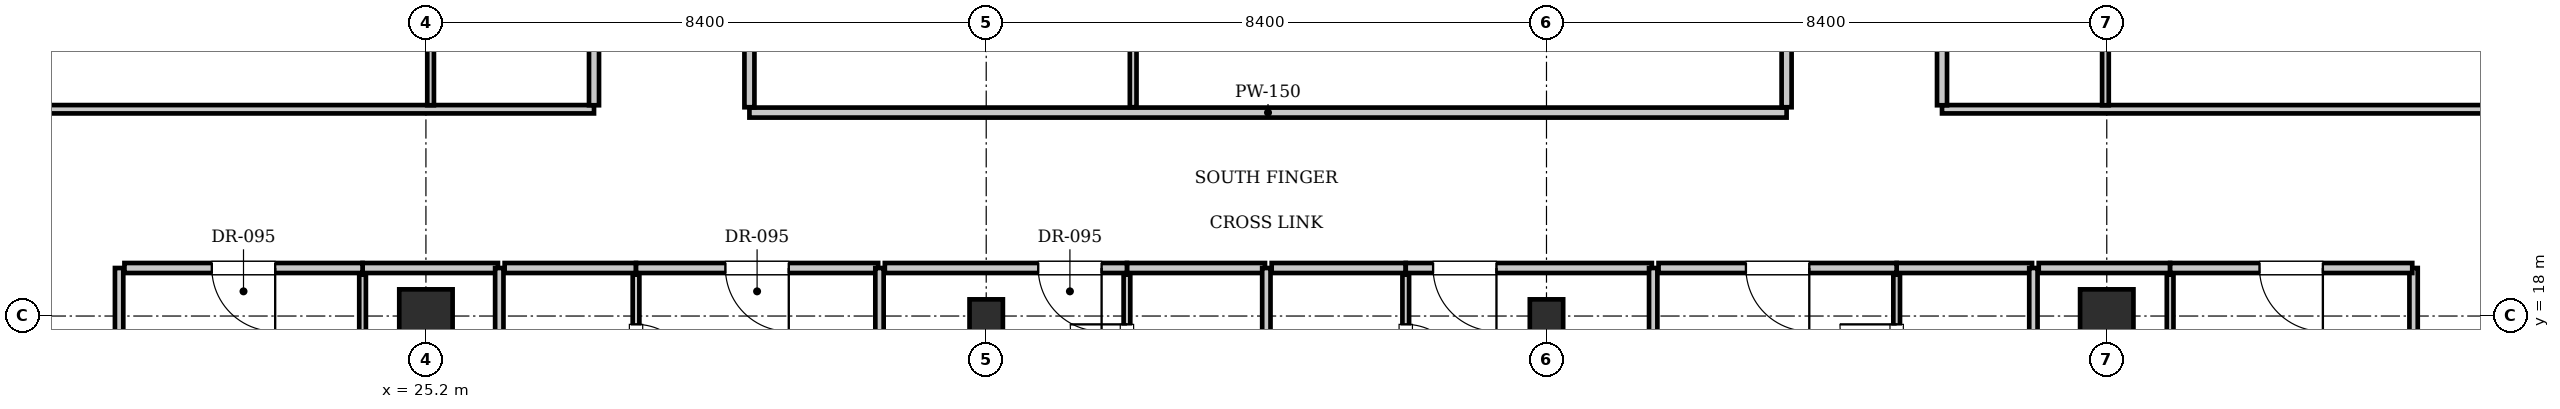
"""IFC4 building model, lengths in metres.
Left out: names, types, materials, properties, quantities, classifications, styles, units other than length and angle.
Written with IfcOpenShell. Run it as: python <this file> out.ifc"""

import sys

from ifc_helpers import new_model, si_unit, direction, frame, frame_2d, origin, origin_2d, place, context, subcontext, project, spatial, rectangle, i_section, extrude, element, fill, save


model = new_model("IFC4")
c1 = context("Model", 3, precision=1e-05, world=origin(), true_north=direction((0.0, 1.0)))
c2 = subcontext(c1, "Body", "Model", "MODEL_VIEW")
j1 = project(units=[si_unit("LENGTHUNIT", "METRE"), si_unit("PLANEANGLEUNIT", "RADIAN")], contexts=[c1])
p1 = place(None, origin())
s1 = spatial("IfcSite", under=j1, at=p1, CompositionType="ELEMENT")
p2 = place(p1, origin())
s2 = spatial("IfcBuilding", under=s1, at=p2, CompositionType="ELEMENT")
p3 = place(p2, frame((0.0, 0.0, 239.4)))
s3 = spatial("IfcBuildingStorey", under=s2, at=p3, CompositionType="ELEMENT", Elevation=239.4)
for number, where, z_axis, x_axis in (
    (1, (25.2, 18.0, 0.0), (0.0, 0.0, 1.0), (1.0, 0.0, 0.0)),
    (2, (50.4, 18.0, 0.0), (0.0, 0.0, 1.0), (1.0, 0.0, 0.0)),
):
    element("IfcColumn", number, at=place(p3, frame(where, z_axis=z_axis, x_axis=x_axis)), inside=s3, PredefinedType="COLUMN", context=c2, shape_type="SweptSolid", body=[
        extrude(rectangle(XDim=0.8, YDim=0.8, at=origin_2d()), origin(), (0.0, 0.0, 1.0), 3.85),
    ])
for number, where, z_axis, x_axis in (
    (3, (33.6, 18.0, 0.0), (0.0, 0.0, 1.0), (1.0, 0.0, 0.0)),
    (4, (42.0, 18.0, 0.0), (0.0, 0.0, 1.0), (1.0, 0.0, 0.0)),
):
    element("IfcColumn", number, at=place(p3, frame(where, z_axis=z_axis, x_axis=x_axis)), inside=s3, PredefinedType="COLUMN", context=c2, shape_type="SweptSolid", body=[
        extrude(i_section(OverallWidth=0.5, OverallDepth=0.5, WebThickness=0.022, FlangeThickness=0.032, at=origin_2d()), origin(), (0.0, 0.0, 1.0), 3.85),
    ])
p4 = place(p3, frame((30.05, 21.05, 0.0), z_axis=(0.0, 0.0, 1.0), x_axis=(1.0, 0.0, 0.0)))
e5 = element("IfcWall", 5, at=p4, inside=s3, PredefinedType="PARTITIONING", context=c2, shape_type="SweptSolid", body=[
    extrude(rectangle(XDim=15.55, YDim=0.15, at=frame_2d((7.775, 0.0))), origin(), (0.0, 0.0, 1.0), 3.61),
])
for number, where, z_axis, x_axis in (
    (6, (30.05, 21.13, 0.0), (0.0, 0.0, 1.0), (0.0, 1.0, 0.0)),
    (7, (45.6, 21.13, 0.0), (0.0, 0.0, 1.0), (0.0, 1.0, 0.0)),
):
    element("IfcWall", number, at=place(p3, frame(where, z_axis=z_axis, x_axis=x_axis)), inside=s3, PredefinedType="PARTITIONING", context=c2, shape_type="SweptSolid", body=[
        extrude(rectangle(XDim=9.49, YDim=0.15, at=frame_2d((4.745, 0.0))), origin(), (0.0, 0.0, 1.0), 3.61),
    ])
p5 = place(p3, frame((35.803, 21.13, 0.0), z_axis=(0.0, 0.0, 1.0), x_axis=(0.0, 1.0, 0.0)))
e8 = element("IfcWall", 8, at=p5, inside=s3, PredefinedType="PARTITIONING", context=c2, shape_type="SweptSolid", body=[
    extrude(rectangle(XDim=9.49, YDim=0.1, at=frame_2d((4.745, 0.0))), origin(), (0.0, 0.0, 1.0), 3.61),
])
for number, where, z_axis, x_axis in (
    (9, (20.6, 14.4, 0.0), (0.0, 0.0, 1.0), (0.0, 1.0, 0.0)),
    (10, (55.0, 14.4, 0.0), (0.0, 0.0, 1.0), (0.0, 1.0, 0.0)),
):
    element("IfcWall", number, at=place(p3, frame(where, z_axis=z_axis, x_axis=x_axis)), inside=s3, PredefinedType="PARTITIONING", context=c2, shape_type="SweptSolid", body=[
        extrude(rectangle(XDim=4.32, YDim=0.125, at=frame_2d((2.16, 0.0))), origin(), (0.0, 0.0, 1.0), 3.61),
    ])
p6 = place(p3, frame((24.25, 18.72, 0.0), z_axis=(0.0, 0.0, 1.0), x_axis=(1.0, 0.0, 0.0)))
e11 = element("IfcWall", 11, at=p6, inside=s3, PredefinedType="PARTITIONING", context=c2, shape_type="SweptSolid", body=[
    extrude(rectangle(XDim=2.03, YDim=0.15, at=frame_2d((1.015, 0.0))), origin(), (0.0, 0.0, 1.0), 3.61),
])
p7 = place(p3, frame((24.25, 16.28, 0.0), z_axis=(0.0, 0.0, 1.0), x_axis=(0.0, 1.0, 0.0)))
e12 = element("IfcWall", 12, at=p7, inside=s3, PredefinedType="PARTITIONING", context=c2, shape_type="SweptSolid", body=[
    extrude(rectangle(XDim=2.34, YDim=0.1, at=frame_2d((1.17, 0.0))), origin(), (0.0, 0.0, 1.0), 3.61),
])
p8 = place(p7, frame((0.265, 0.0, 0.0)))
e13 = element("IfcOpeningElement", 13, at=p8, cuts=e12, PredefinedType="OPENING", context=c2, shape_type="SweptSolid", body=[
    extrude(rectangle(XDim=0.85, YDim=2.1, at=frame_2d((0.425, 1.05))), frame((0.0, 0.06, 0.0), z_axis=(0.0, -1.0, 0.0), x_axis=(1.0, 0.0, 0.0)), (0.0, 0.0, 1.0), 0.12),
])
p9 = place(p3, frame((20.68, 18.72, 0.0), z_axis=(0.0, 0.0, 1.0), x_axis=(1.0, 0.0, 0.0)))
e14 = element("IfcWall", 14, at=p9, inside=s3, PredefinedType="PARTITIONING", context=c2, shape_type="SweptSolid", body=[
    extrude(rectangle(XDim=3.57, YDim=0.15, at=frame_2d((1.785, 0.0))), origin(), (0.0, 0.0, 1.0), 3.61),
])
p10 = place(p9, frame((1.31, 0.0, 0.0)))
e15 = element("IfcOpeningElement", 15, at=p10, cuts=e14, PredefinedType="OPENING", context=c2, shape_type="SweptSolid", body=[
    extrude(rectangle(XDim=0.95, YDim=2.15, at=frame_2d((0.475, 1.075))), frame((0.0, 0.085, 0.0), z_axis=(0.0, -1.0, 0.0), x_axis=(1.0, 0.0, 0.0)), (0.0, 0.0, 1.0), 0.17),
])
p11 = place(p3, frame((26.3, 9.3, 0.0), z_axis=(0.0, 0.0, 1.0), x_axis=(0.0, 1.0, 0.0)))
e16 = element("IfcWall", 16, at=p11, inside=s3, PredefinedType="PARTITIONING", context=c2, shape_type="SweptSolid", body=[
    extrude(rectangle(XDim=9.42, YDim=0.125, at=frame_2d((4.71, 0.0))), origin(), (0.0, 0.0, 1.0), 3.61),
])
p12 = place(p3, frame((26.38, 18.72, 0.0), z_axis=(0.0, 0.0, 1.0), x_axis=(1.0, 0.0, 0.0)))
e17 = element("IfcWall", 17, at=p12, inside=s3, PredefinedType="PARTITIONING", context=c2, shape_type="SweptSolid", body=[
    extrude(rectangle(XDim=1.97, YDim=0.15, at=frame_2d((0.985, 0.0))), origin(), (0.0, 0.0, 1.0), 3.61),
])
p13 = place(p3, frame((28.35, 16.28, 0.0), z_axis=(0.0, 0.0, 1.0), x_axis=(0.0, 1.0, 0.0)))
e18 = element("IfcWall", 18, at=p13, inside=s3, PredefinedType="PARTITIONING", context=c2, shape_type="SweptSolid", body=[
    extrude(rectangle(XDim=2.34, YDim=0.1, at=frame_2d((1.17, 0.0))), origin(), (0.0, 0.0, 1.0), 3.61),
])
p14 = place(p13, frame((0.745, 0.0, 0.0)))
e19 = element("IfcOpeningElement", 19, at=p14, cuts=e18, PredefinedType="OPENING", context=c2, shape_type="SweptSolid", body=[
    extrude(rectangle(XDim=0.85, YDim=2.1, at=frame_2d((0.425, 1.05))), frame((0.0, 0.06, 0.0), z_axis=(0.0, -1.0, 0.0), x_axis=(1.0, 0.0, 0.0)), (0.0, 0.0, 1.0), 0.12),
])
p15 = place(p3, frame((28.35, 18.72, 0.0), z_axis=(0.0, 0.0, 1.0), x_axis=(1.0, 0.0, 0.0)))
e20 = element("IfcWall", 20, at=p15, inside=s3, PredefinedType="PARTITIONING", context=c2, shape_type="SweptSolid", body=[
    extrude(rectangle(XDim=3.63, YDim=0.15, at=frame_2d((1.815, 0.0))), origin(), (0.0, 0.0, 1.0), 3.61),
])
p16 = place(p15, frame((1.34, 0.0, 0.0)))
e21 = element("IfcOpeningElement", 21, at=p16, cuts=e20, PredefinedType="OPENING", context=c2, shape_type="SweptSolid", body=[
    extrude(rectangle(XDim=0.95, YDim=2.15, at=frame_2d((0.475, 1.075))), frame((0.0, 0.085, 0.0), z_axis=(0.0, -1.0, 0.0), x_axis=(1.0, 0.0, 0.0)), (0.0, 0.0, 1.0), 0.17),
])
p17 = place(p3, frame((32.0, 9.3, 0.0), z_axis=(0.0, 0.0, 1.0), x_axis=(0.0, 1.0, 0.0)))
e22 = element("IfcWall", 22, at=p17, inside=s3, PredefinedType="PARTITIONING", context=c2, shape_type="SweptSolid", body=[
    extrude(rectangle(XDim=9.42, YDim=0.125, at=frame_2d((4.71, 0.0))), origin(), (0.0, 0.0, 1.0), 3.61),
])
p18 = place(p3, frame((35.71, 18.72, 0.0), z_axis=(0.0, 0.0, 1.0), x_axis=(1.0, 0.0, 0.0)))
e23 = element("IfcWall", 23, at=p18, inside=s3, PredefinedType="PARTITIONING", context=c2, shape_type="SweptSolid", body=[
    extrude(rectangle(XDim=2.07, YDim=0.15, at=frame_2d((1.035, 0.0))), origin(), (0.0, 0.0, 1.0), 3.61),
])
p19 = place(p3, frame((35.71, 16.28, 0.0), z_axis=(0.0, 0.0, 1.0), x_axis=(0.0, 1.0, 0.0)))
e24 = element("IfcWall", 24, at=p19, inside=s3, PredefinedType="PARTITIONING", context=c2, shape_type="SweptSolid", body=[
    extrude(rectangle(XDim=2.34, YDim=0.1, at=frame_2d((1.17, 0.0))), origin(), (0.0, 0.0, 1.0), 3.61),
])
p20 = place(p19, frame((0.745, 0.0, 0.0)))
e25 = element("IfcOpeningElement", 25, at=p20, cuts=e24, PredefinedType="OPENING", context=c2, shape_type="SweptSolid", body=[
    extrude(rectangle(XDim=0.85, YDim=2.1, at=frame_2d((0.425, 1.05))), frame((0.0, 0.06, 0.0), z_axis=(0.0, -1.0, 0.0), x_axis=(1.0, 0.0, 0.0)), (0.0, 0.0, 1.0), 0.12),
])
p21 = place(p3, frame((32.08, 18.72, 0.0), z_axis=(0.0, 0.0, 1.0), x_axis=(1.0, 0.0, 0.0)))
e26 = element("IfcWall", 26, at=p21, inside=s3, PredefinedType="PARTITIONING", context=c2, shape_type="SweptSolid", body=[
    extrude(rectangle(XDim=3.63, YDim=0.15, at=frame_2d((1.815, 0.0))), origin(), (0.0, 0.0, 1.0), 3.61),
])
p22 = place(p21, frame((2.3, 0.0, 0.0)))
e27 = element("IfcOpeningElement", 27, at=p22, cuts=e26, PredefinedType="OPENING", context=c2, shape_type="SweptSolid", body=[
    extrude(rectangle(XDim=0.95, YDim=2.15, at=frame_2d((0.475, 1.075))), frame((0.0, 0.085, 0.0), z_axis=(0.0, -1.0, 0.0), x_axis=(1.0, 0.0, 0.0)), (0.0, 0.0, 1.0), 0.17),
])
p23 = place(p3, frame((37.8, 9.3, 0.0), z_axis=(0.0, 0.0, 1.0), x_axis=(0.0, 1.0, 0.0)))
e28 = element("IfcWall", 28, at=p23, inside=s3, PredefinedType="PARTITIONING", context=c2, shape_type="SweptSolid", body=[
    extrude(rectangle(XDim=9.42, YDim=0.125, at=frame_2d((4.71, 0.0))), origin(), (0.0, 0.0, 1.0), 3.293),
])
p24 = place(p3, frame((37.88, 18.72, 0.0), z_axis=(0.0, 0.0, 1.0), x_axis=(1.0, 0.0, 0.0)))
e29 = element("IfcWall", 29, at=p24, inside=s3, PredefinedType="PARTITIONING", context=c2, shape_type="SweptSolid", body=[
    extrude(rectangle(XDim=2.01, YDim=0.15, at=frame_2d((1.005, 0.0))), origin(), (0.0, 0.0, 1.0), 3.61),
])
p25 = place(p3, frame((39.89, 16.28, 0.0), z_axis=(0.0, 0.0, 1.0), x_axis=(0.0, 1.0, 0.0)))
e30 = element("IfcWall", 30, at=p25, inside=s3, PredefinedType="PARTITIONING", context=c2, shape_type="SweptSolid", body=[
    extrude(rectangle(XDim=2.34, YDim=0.1, at=frame_2d((1.17, 0.0))), origin(), (0.0, 0.0, 1.0), 3.61),
])
p26 = place(p25, frame((0.745, 0.0, 0.0)))
e31 = element("IfcOpeningElement", 31, at=p26, cuts=e30, PredefinedType="OPENING", context=c2, shape_type="SweptSolid", body=[
    extrude(rectangle(XDim=0.85, YDim=2.1, at=frame_2d((0.425, 1.05))), frame((0.0, 0.06, 0.0), z_axis=(0.0, -1.0, 0.0), x_axis=(1.0, 0.0, 0.0)), (0.0, 0.0, 1.0), 0.12),
])
p27 = place(p3, frame((39.89, 18.72, 0.0), z_axis=(0.0, 0.0, 1.0), x_axis=(1.0, 0.0, 0.0)))
e32 = element("IfcWall", 32, at=p27, inside=s3, PredefinedType="PARTITIONING", context=c2, shape_type="SweptSolid", body=[
    extrude(rectangle(XDim=3.69, YDim=0.15, at=frame_2d((1.845, 0.0))), origin(), (0.0, 0.0, 1.0), 3.61),
])
p28 = place(p27, frame((0.41, 0.0, 0.0)))
e33 = element("IfcOpeningElement", 33, at=p28, cuts=e32, PredefinedType="OPENING", context=c2, shape_type="SweptSolid", body=[
    extrude(rectangle(XDim=0.95, YDim=2.15, at=frame_2d((0.475, 1.075))), frame((0.0, 0.085, 0.0), z_axis=(0.0, -1.0, 0.0), x_axis=(1.0, 0.0, 0.0)), (0.0, 0.0, 1.0), 0.17),
])
p29 = place(p3, frame((43.6, 9.3, 0.0), z_axis=(0.0, 0.0, 1.0), x_axis=(0.0, 1.0, 0.0)))
e34 = element("IfcWall", 34, at=p29, inside=s3, PredefinedType="PARTITIONING", context=c2, shape_type="SweptSolid", body=[
    extrude(rectangle(XDim=9.42, YDim=0.125, at=frame_2d((4.71, 0.0))), origin(), (0.0, 0.0, 1.0), 3.61),
])
p30 = place(p3, frame((47.25, 18.72, 0.0), z_axis=(0.0, 0.0, 1.0), x_axis=(1.0, 0.0, 0.0)))
e35 = element("IfcWall", 35, at=p30, inside=s3, PredefinedType="PARTITIONING", context=c2, shape_type="SweptSolid", body=[
    extrude(rectangle(XDim=2.03, YDim=0.15, at=frame_2d((1.015, 0.0))), origin(), (0.0, 0.0, 1.0), 3.61),
])
p31 = place(p3, frame((47.25, 16.28, 0.0), z_axis=(0.0, 0.0, 1.0), x_axis=(0.0, 1.0, 0.0)))
e36 = element("IfcWall", 36, at=p31, inside=s3, PredefinedType="PARTITIONING", context=c2, shape_type="SweptSolid", body=[
    extrude(rectangle(XDim=2.34, YDim=0.1, at=frame_2d((1.17, 0.0))), origin(), (0.0, 0.0, 1.0), 3.61),
])
p32 = place(p31, frame((0.745, 0.0, 0.0)))
e37 = element("IfcOpeningElement", 37, at=p32, cuts=e36, PredefinedType="OPENING", context=c2, shape_type="SweptSolid", body=[
    extrude(rectangle(XDim=0.85, YDim=2.1, at=frame_2d((0.425, 1.05))), frame((0.0, 0.06, 0.0), z_axis=(0.0, -1.0, 0.0), x_axis=(1.0, 0.0, 0.0)), (0.0, 0.0, 1.0), 0.12),
])
p33 = place(p3, frame((43.68, 18.72, 0.0), z_axis=(0.0, 0.0, 1.0), x_axis=(1.0, 0.0, 0.0)))
e38 = element("IfcWall", 38, at=p33, inside=s3, PredefinedType="PARTITIONING", context=c2, shape_type="SweptSolid", body=[
    extrude(rectangle(XDim=3.57, YDim=0.15, at=frame_2d((1.785, 0.0))), origin(), (0.0, 0.0, 1.0), 3.61),
])
p34 = place(p33, frame((1.31, 0.0, 0.0)))
e39 = element("IfcOpeningElement", 39, at=p34, cuts=e38, PredefinedType="OPENING", context=c2, shape_type="SweptSolid", body=[
    extrude(rectangle(XDim=0.95, YDim=2.15, at=frame_2d((0.475, 1.075))), frame((0.0, 0.085, 0.0), z_axis=(0.0, -1.0, 0.0), x_axis=(1.0, 0.0, 0.0)), (0.0, 0.0, 1.0), 0.17),
])
p35 = place(p3, frame((49.3, 9.3, 0.0), z_axis=(0.0, 0.0, 1.0), x_axis=(0.0, 1.0, 0.0)))
e40 = element("IfcWall", 40, at=p35, inside=s3, PredefinedType="PARTITIONING", context=c2, shape_type="SweptSolid", body=[
    extrude(rectangle(XDim=9.42, YDim=0.125, at=frame_2d((4.71, 0.0))), origin(), (0.0, 0.0, 1.0), 3.61),
])
p36 = place(p3, frame((49.38, 18.72, 0.0), z_axis=(0.0, 0.0, 1.0), x_axis=(1.0, 0.0, 0.0)))
e41 = element("IfcWall", 41, at=p36, inside=s3, PredefinedType="PARTITIONING", context=c2, shape_type="SweptSolid", body=[
    extrude(rectangle(XDim=1.97, YDim=0.15, at=frame_2d((0.985, 0.0))), origin(), (0.0, 0.0, 1.0), 3.61),
])
p37 = place(p3, frame((51.35, 16.28, 0.0), z_axis=(0.0, 0.0, 1.0), x_axis=(0.0, 1.0, 0.0)))
e42 = element("IfcWall", 42, at=p37, inside=s3, PredefinedType="PARTITIONING", context=c2, shape_type="SweptSolid", body=[
    extrude(rectangle(XDim=2.34, YDim=0.1, at=frame_2d((1.17, 0.0))), origin(), (0.0, 0.0, 1.0), 3.61),
])
p38 = place(p37, frame((0.265, 0.0, 0.0)))
e43 = element("IfcOpeningElement", 43, at=p38, cuts=e42, PredefinedType="OPENING", context=c2, shape_type="SweptSolid", body=[
    extrude(rectangle(XDim=0.85, YDim=2.1, at=frame_2d((0.425, 1.05))), frame((0.0, 0.06, 0.0), z_axis=(0.0, -1.0, 0.0), x_axis=(1.0, 0.0, 0.0)), (0.0, 0.0, 1.0), 0.12),
])
p39 = place(p3, frame((51.35, 18.72, 0.0), z_axis=(0.0, 0.0, 1.0), x_axis=(1.0, 0.0, 0.0)))
e44 = element("IfcWall", 44, at=p39, inside=s3, PredefinedType="PARTITIONING", context=c2, shape_type="SweptSolid", body=[
    extrude(rectangle(XDim=3.63, YDim=0.15, at=frame_2d((1.815, 0.0))), origin(), (0.0, 0.0, 1.0), 3.61),
])
p40 = place(p39, frame((1.34, 0.0, 0.0)))
e45 = element("IfcOpeningElement", 45, at=p40, cuts=e44, PredefinedType="OPENING", context=c2, shape_type="SweptSolid", body=[
    extrude(rectangle(XDim=0.95, YDim=2.15, at=frame_2d((0.475, 1.075))), frame((0.0, 0.085, 0.0), z_axis=(0.0, -1.0, 0.0), x_axis=(1.0, 0.0, 0.0)), (0.0, 0.0, 1.0), 0.17),
])
p41 = place(p3, frame((15.5, 21.1, 0.0), z_axis=(0.0, 0.0, 1.0), x_axis=(1.0, 0.0, 0.0)))
e46 = element("IfcWall", 46, at=p41, inside=s3, PredefinedType="PARTITIONING", context=c2, shape_type="SweptSolid", body=[
    extrude(rectangle(XDim=12.22, YDim=0.125, at=frame_2d((6.11, 0.0))), origin(), (0.0, 0.0, 1.0), 3.61),
])
p42 = place(p3, frame((47.93, 21.1, 0.0), z_axis=(0.0, 0.0, 1.0), x_axis=(1.0, 0.0, 0.0)))
e47 = element("IfcWall", 47, at=p42, inside=s3, PredefinedType="PARTITIONING", context=c2, shape_type="SweptSolid", body=[
    extrude(rectangle(XDim=12.17, YDim=0.125, at=frame_2d((6.085, 0.0))), origin(), (0.0, 0.0, 1.0), 3.61),
])
p43 = place(p3, frame((27.72, 21.16, 0.0), z_axis=(0.0, 0.0, 1.0), x_axis=(0.0, 1.0, 0.0)))
e48 = element("IfcWall", 48, at=p43, inside=s3, PredefinedType="PARTITIONING", context=c2, shape_type="SweptSolid", body=[
    extrude(rectangle(XDim=1.97, YDim=0.15, at=frame_2d((0.985, 0.0))), origin(), (0.0, 0.0, 1.0), 3.61),
])
p44 = place(p3, frame((25.27, 21.16, 0.0), z_axis=(0.0, 0.0, 1.0), x_axis=(0.0, 1.0, 0.0)))
e49 = element("IfcWall", 49, at=p44, inside=s3, PredefinedType="PARTITIONING", context=c2, shape_type="SweptSolid", body=[
    extrude(rectangle(XDim=1.97, YDim=0.1, at=frame_2d((0.985, 0.0))), origin(), (0.0, 0.0, 1.0), 3.077),
])
p45 = place(p3, frame((47.93, 21.16, 0.0), z_axis=(0.0, 0.0, 1.0), x_axis=(0.0, 1.0, 0.0)))
e50 = element("IfcWall", 50, at=p45, inside=s3, PredefinedType="PARTITIONING", context=c2, shape_type="SweptSolid", body=[
    extrude(rectangle(XDim=1.97, YDim=0.15, at=frame_2d((0.985, 0.0))), origin(), (0.0, 0.0, 1.0), 3.61),
])
p46 = place(p3, frame((50.38, 21.16, 0.0), z_axis=(0.0, 0.0, 1.0), x_axis=(0.0, 1.0, 0.0)))
e51 = element("IfcWall", 51, at=p46, inside=s3, PredefinedType="PARTITIONING", context=c2, shape_type="SweptSolid", body=[
    extrude(rectangle(XDim=1.97, YDim=0.1, at=frame_2d((0.985, 0.0))), origin(), (0.0, 0.0, 1.0), 3.077),
])
p47 = place(p10, frame((0.95, 0.0, 0.0), z_axis=(0.0, 0.0, 1.0), x_axis=(-1.0, 0.0, 0.0)))
e52 = element("IfcDoor", 52, at=p47, inside=s3, OperationType="SINGLE_SWING_LEFT", PredefinedType="DOOR", context=c2, shape_type="SweptSolid", body=[
    extrude(rectangle(XDim=0.95, YDim=2.15, at=frame_2d((0.475, 1.075))), frame((0.0, 0.025, 0.0), z_axis=(0.0, -1.0, 0.0), x_axis=(1.0, 0.0, 0.0)), (0.0, 0.0, 1.0), 0.05),
])
fill(e15, e52)
p48 = place(p14, frame((0.85, 0.0, 0.0), z_axis=(0.0, 0.0, 1.0), x_axis=(-1.0, 0.0, 0.0)))
e53 = element("IfcDoor", 53, at=p48, inside=s3, OperationType="SINGLE_SWING_RIGHT", PredefinedType="DOOR", context=c2, shape_type="SweptSolid", body=[
    extrude(rectangle(XDim=0.85, YDim=2.1, at=frame_2d((0.425, 1.05))), frame((0.0, 0.025, 0.0), z_axis=(0.0, -1.0, 0.0), x_axis=(1.0, 0.0, 0.0)), (0.0, 0.0, 1.0), 0.05),
])
fill(e19, e53)
p49 = place(p16, frame((0.95, 0.0, 0.0), z_axis=(0.0, 0.0, 1.0), x_axis=(-1.0, 0.0, 0.0)))
e54 = element("IfcDoor", 54, at=p49, inside=s3, OperationType="SINGLE_SWING_LEFT", PredefinedType="DOOR", context=c2, shape_type="SweptSolid", body=[
    extrude(rectangle(XDim=0.95, YDim=2.15, at=frame_2d((0.475, 1.075))), frame((0.0, 0.025, 0.0), z_axis=(0.0, -1.0, 0.0), x_axis=(1.0, 0.0, 0.0)), (0.0, 0.0, 1.0), 0.05),
])
fill(e21, e54)
p50 = place(p20, origin())
e55 = element("IfcDoor", 55, at=p50, inside=s3, OperationType="SINGLE_SWING_RIGHT", PredefinedType="DOOR", context=c2, shape_type="SweptSolid", body=[
    extrude(rectangle(XDim=0.85, YDim=2.1, at=frame_2d((0.425, 1.05))), frame((0.0, 0.025, 0.0), z_axis=(0.0, -1.0, 0.0), x_axis=(1.0, 0.0, 0.0)), (0.0, 0.0, 1.0), 0.05),
])
fill(e25, e55)
p51 = place(p22, frame((0.95, 0.0, 0.0), z_axis=(0.0, 0.0, 1.0), x_axis=(-1.0, 0.0, 0.0)))
e56 = element("IfcDoor", 56, at=p51, inside=s3, OperationType="SINGLE_SWING_LEFT", PredefinedType="DOOR", context=c2, shape_type="SweptSolid", body=[
    extrude(rectangle(XDim=0.95, YDim=2.15, at=frame_2d((0.475, 1.075))), frame((0.0, 0.025, 0.0), z_axis=(0.0, -1.0, 0.0), x_axis=(1.0, 0.0, 0.0)), (0.0, 0.0, 1.0), 0.05),
])
fill(e27, e56)
p52 = place(p26, frame((0.85, 0.0, 0.0), z_axis=(0.0, 0.0, 1.0), x_axis=(-1.0, 0.0, 0.0)))
e57 = element("IfcDoor", 57, at=p52, inside=s3, OperationType="SINGLE_SWING_RIGHT", PredefinedType="DOOR", context=c2, shape_type="SweptSolid", body=[
    extrude(rectangle(XDim=0.85, YDim=2.1, at=frame_2d((0.425, 1.05))), frame((0.0, 0.025, 0.0), z_axis=(0.0, -1.0, 0.0), x_axis=(1.0, 0.0, 0.0)), (0.0, 0.0, 1.0), 0.05),
])
fill(e31, e57)
p53 = place(p28, frame((0.95, 0.0, 0.0), z_axis=(0.0, 0.0, 1.0), x_axis=(-1.0, 0.0, 0.0)))
e58 = element("IfcDoor", 58, at=p53, inside=s3, OperationType="SINGLE_SWING_LEFT", PredefinedType="DOOR", context=c2, shape_type="SweptSolid", body=[
    extrude(rectangle(XDim=0.95, YDim=2.15, at=frame_2d((0.475, 1.075))), frame((0.0, 0.025, 0.0), z_axis=(0.0, -1.0, 0.0), x_axis=(1.0, 0.0, 0.0)), (0.0, 0.0, 1.0), 0.05),
])
fill(e33, e58)
p54 = place(p32, origin())
e59 = element("IfcDoor", 59, at=p54, inside=s3, OperationType="SINGLE_SWING_RIGHT", PredefinedType="DOOR", context=c2, shape_type="SweptSolid", body=[
    extrude(rectangle(XDim=0.85, YDim=2.1, at=frame_2d((0.425, 1.05))), frame((0.0, 0.025, 0.0), z_axis=(0.0, -1.0, 0.0), x_axis=(1.0, 0.0, 0.0)), (0.0, 0.0, 1.0), 0.05),
])
fill(e37, e59)
p55 = place(p34, frame((0.95, 0.0, 0.0), z_axis=(0.0, 0.0, 1.0), x_axis=(-1.0, 0.0, 0.0)))
e60 = element("IfcDoor", 60, at=p55, inside=s3, OperationType="SINGLE_SWING_LEFT", PredefinedType="DOOR", context=c2, shape_type="SweptSolid", body=[
    extrude(rectangle(XDim=0.95, YDim=2.15, at=frame_2d((0.475, 1.075))), frame((0.0, 0.025, 0.0), z_axis=(0.0, -1.0, 0.0), x_axis=(1.0, 0.0, 0.0)), (0.0, 0.0, 1.0), 0.05),
])
fill(e39, e60)
p56 = place(p40, frame((0.95, 0.0, 0.0), z_axis=(0.0, 0.0, 1.0), x_axis=(-1.0, 0.0, 0.0)))
e61 = element("IfcDoor", 61, at=p56, inside=s3, OperationType="SINGLE_SWING_LEFT", PredefinedType="DOOR", context=c2, shape_type="SweptSolid", body=[
    extrude(rectangle(XDim=0.95, YDim=2.15, at=frame_2d((0.475, 1.075))), frame((0.0, 0.025, 0.0), z_axis=(0.0, -1.0, 0.0), x_axis=(1.0, 0.0, 0.0)), (0.0, 0.0, 1.0), 0.05),
])
fill(e45, e61)
save(model, sys.argv[1])
